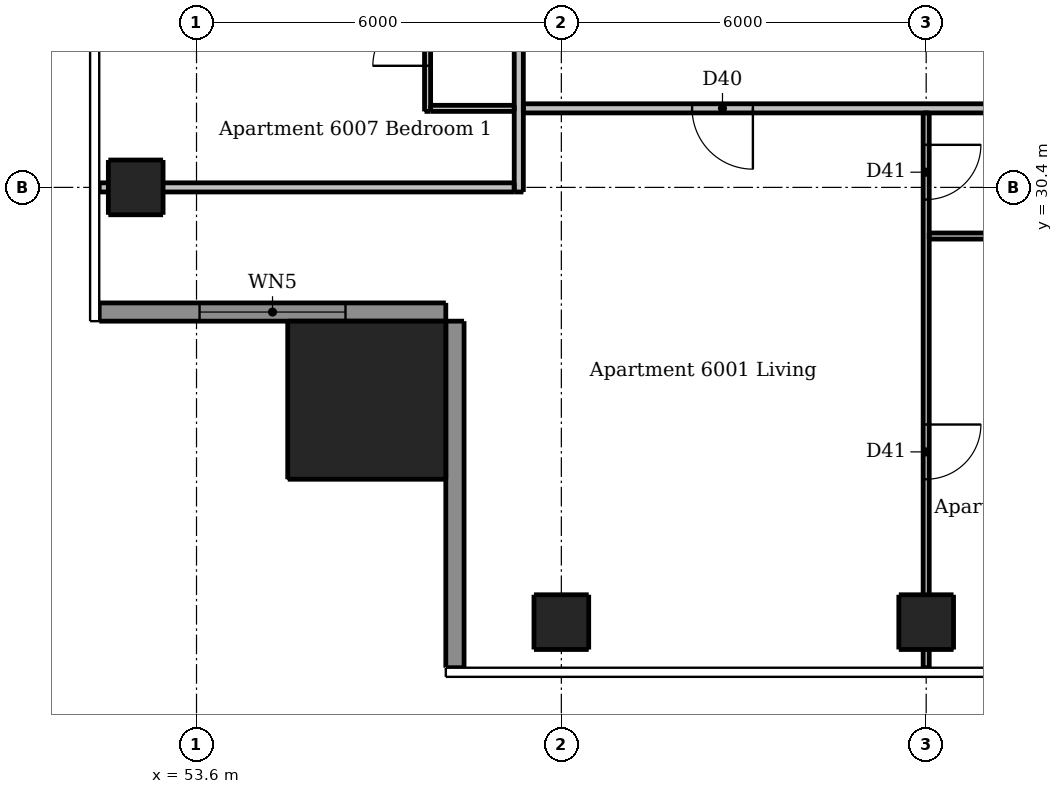
"""IFC4 building model, lengths in metres.
Left out: names, types, materials, properties, quantities, classifications, styles, units other than length and angle.
Written with IfcOpenShell. Run it as: python <this file> out.ifc"""

import sys

from ifc_helpers import new_model, si_unit, direction, frame, frame_2d, origin, origin_2d, place, context, subcontext, project, spatial, rectangle, extrude, element, fill, save


model = new_model("IFC4")
c1 = context("Model", 3, precision=1e-05, world=origin(), true_north=direction((0.0, 1.0)))
c2 = subcontext(c1, "Body", "Model", "MODEL_VIEW")
j1 = project(units=[si_unit("LENGTHUNIT", "METRE"), si_unit("PLANEANGLEUNIT", "RADIAN")], contexts=[c1])
p1 = place(None, origin())
s1 = spatial("IfcSite", under=j1, at=p1, CompositionType="ELEMENT")
p2 = place(p1, origin())
s2 = spatial("IfcBuilding", under=s1, at=p2, CompositionType="ELEMENT")
p3 = place(p2, frame((0.0, 0.0, 223.3)))
s3 = spatial("IfcBuildingStorey", under=s2, at=p3, CompositionType="ELEMENT", Elevation=223.3)
for number, where, z_axis, x_axis in (
    (1, (59.6, 23.25, 0.0), (0.0, 0.0, 1.0), (1.0, 0.0, 0.0)),
    (2, (65.6, 23.25, 0.0), (0.0, 0.0, 1.0), (1.0, 0.0, 0.0)),
    (3, (52.6, 30.4, 0.0), (0.0, 0.0, 1.0), (1.0, 0.0, 0.0)),
):
    element("IfcColumn", number, at=place(p3, frame(where, z_axis=z_axis, x_axis=x_axis)), inside=s3, PredefinedType="COLUMN", context=c2, shape_type="SweptSolid", body=[
        extrude(rectangle(XDim=0.9, YDim=0.9, at=origin_2d()), origin(), (0.0, 0.0, 1.0), 3.05),
    ])
p4 = place(p3, frame((56.4, 26.9, 0.0), z_axis=(0.0, 0.0, 1.0), x_axis=(1.0, 0.0, 0.0)))
e4 = element("IfcColumn", 4, at=p4, inside=s3, PredefinedType="COLUMN", context=c2, shape_type="SweptSolid", body=[
    extrude(rectangle(XDim=2.6, YDim=2.6, at=origin_2d()), origin(), (0.0, 0.0, 1.0), 3.3),
])
p5 = place(p3, frame((52.0, 28.35, 0.0), z_axis=(0.0, 0.0, 1.0), x_axis=(1.0, 0.0, 0.0)))
e5 = element("IfcWall", 5, at=p5, inside=s3, PredefinedType="SOLIDWALL", context=c2, shape_type="SweptSolid", body=[
    extrude(rectangle(XDim=5.7, YDim=0.3, at=frame_2d((2.85, 0.0))), origin(), (0.0, 0.0, 1.0), 3.05),
])
p6 = place(p5, frame((1.65, 0.0, 0.15)))
e6 = element("IfcOpeningElement", 6, at=p6, cuts=e5, PredefinedType="OPENING", context=c2, shape_type="SweptSolid", body=[
    extrude(rectangle(XDim=2.4, YDim=2.1, at=frame_2d((1.2, 1.05))), frame((0.0, 0.16, 0.0), z_axis=(0.0, -1.0, 0.0), x_axis=(1.0, 0.0, 0.0)), (0.0, 0.0, 1.0), 0.32),
])
p7 = place(p3, frame((57.85, 28.2, 0.0), z_axis=(0.0, 0.0, 1.0), x_axis=(0.0, -1.0, 0.0)))
e7 = element("IfcWall", 7, at=p7, inside=s3, PredefinedType="SOLIDWALL", context=c2, shape_type="SweptSolid", body=[
    extrude(rectangle(XDim=5.7, YDim=0.3, at=frame_2d((2.85, 0.0))), origin(), (0.0, 0.0, 1.0), 3.05),
])
p8 = place(p3, frame((57.4, 31.65, 0.0), z_axis=(0.0, 0.0, 1.0), x_axis=(0.0, 1.0, 0.0)))
e8 = element("IfcWall", 8, at=p8, inside=s3, PredefinedType="PARTITIONING", context=c2, shape_type="SweptSolid", body=[
    extrude(rectangle(XDim=16.675, YDim=0.1, at=frame_2d((8.337, 0.0))), origin(), (0.0, 0.0, 1.0), 3.05),
])
p9 = place(p8, frame((9.7, 0.0, 0.0)))
e9 = element("IfcOpeningElement", 9, at=p9, cuts=e8, PredefinedType="OPENING", context=c2, shape_type="SweptSolid", body=[
    extrude(rectangle(XDim=0.9, YDim=2.1, at=frame_2d((0.45, 1.05))), frame((0.0, 0.06, 0.0), z_axis=(0.0, -1.0, 0.0), x_axis=(1.0, 0.0, 0.0)), (0.0, 0.0, 1.0), 0.12),
])
p10 = place(p8, frame((14.8, 0.0, 0.0)))
e10 = element("IfcOpeningElement", 10, at=p10, cuts=e8, PredefinedType="OPENING", context=c2, shape_type="SweptSolid", body=[
    extrude(rectangle(XDim=0.9, YDim=2.1, at=frame_2d((0.45, 1.05))), frame((0.0, 0.06, 0.0), z_axis=(0.0, -1.0, 0.0), x_axis=(1.0, 0.0, 0.0)), (0.0, 0.0, 1.0), 0.12),
])
p11 = place(p8, frame((5.25, 0.0, 0.0)))
e11 = element("IfcOpeningElement", 11, at=p11, cuts=e8, PredefinedType="OPENING", context=c2, shape_type="SweptSolid", body=[
    extrude(rectangle(XDim=0.8, YDim=2.1, at=frame_2d((0.4, 1.05))), frame((0.0, 0.06, 0.0), z_axis=(0.0, -1.0, 0.0), x_axis=(1.0, 0.0, 0.0)), (0.0, 0.0, 1.0), 0.12),
])
p12 = place(p8, frame((0.75, 0.0, 0.0)))
e12 = element("IfcOpeningElement", 12, at=p12, cuts=e8, PredefinedType="OPENING", context=c2, shape_type="SweptSolid", body=[
    extrude(rectangle(XDim=0.9, YDim=2.1, at=frame_2d((0.45, 1.05))), frame((0.0, 0.06, 0.0), z_axis=(0.0, -1.0, 0.0), x_axis=(1.0, 0.0, 0.0)), (0.0, 0.0, 1.0), 0.12),
])
p13 = place(p8, frame((3.15, 0.0, 0.0)))
e13 = element("IfcOpeningElement", 13, at=p13, cuts=e8, PredefinedType="OPENING", context=c2, shape_type="SweptSolid", body=[
    extrude(rectangle(XDim=0.8, YDim=2.1, at=frame_2d((0.4, 1.05))), frame((0.0, 0.06, 0.0), z_axis=(0.0, -1.0, 0.0), x_axis=(1.0, 0.0, 0.0)), (0.0, 0.0, 1.0), 0.12),
])
p14 = place(p3, frame((65.6, 31.625, 0.0), z_axis=(0.0, 0.0, 1.0), x_axis=(0.0, -1.0, 0.0)))
e14 = element("IfcWall", 14, at=p14, inside=s3, PredefinedType="PARTITIONING", context=c2, shape_type="SweptSolid", body=[
    extrude(rectangle(XDim=9.125, YDim=0.1, at=frame_2d((4.562, 0.0))), origin(), (0.0, 0.0, 1.0), 2.516),
])
p15 = place(p14, frame((0.525, 0.0, 0.0)))
e15 = element("IfcOpeningElement", 15, at=p15, cuts=e14, PredefinedType="OPENING", context=c2, shape_type="SweptSolid", body=[
    extrude(rectangle(XDim=0.9, YDim=2.1, at=frame_2d((0.45, 1.05))), frame((0.0, 0.06, 0.0), z_axis=(0.0, -1.0, 0.0), x_axis=(1.0, 0.0, 0.0)), (0.0, 0.0, 1.0), 0.12),
])
p16 = place(p14, frame((5.125, 0.0, 0.0)))
e16 = element("IfcOpeningElement", 16, at=p16, cuts=e14, PredefinedType="OPENING", context=c2, shape_type="SweptSolid", body=[
    extrude(rectangle(XDim=0.9, YDim=2.1, at=frame_2d((0.45, 1.05))), frame((0.0, 0.06, 0.0), z_axis=(0.0, -1.0, 0.0), x_axis=(1.0, 0.0, 0.0)), (0.0, 0.0, 1.0), 0.12),
])
p17 = place(p3, frame((57.45, 31.7, 0.0), z_axis=(0.0, 0.0, 1.0), x_axis=(1.0, 0.0, 0.0)))
e17 = element("IfcWall", 17, at=p17, inside=s3, PredefinedType="PARTITIONING", context=c2, shape_type="SweptSolid", body=[
    extrude(rectangle(XDim=1.375, YDim=0.1, at=frame_2d((0.688, 0.0))), origin(), (0.0, 0.0, 1.0), 3.05),
])
p18 = place(p3, frame((65.65, 29.6, 0.0), z_axis=(0.0, 0.0, 1.0), x_axis=(1.0, 0.0, 0.0)))
e18 = element("IfcWall", 18, at=p18, inside=s3, PredefinedType="PARTITIONING", context=c2, shape_type="SweptSolid", body=[
    extrude(rectangle(XDim=5.875, YDim=0.1, at=frame_2d((2.938, 0.0))), origin(), (0.0, 0.0, 1.0), 3.05),
])
p19 = place(p18, frame((3.75, 0.0, 0.0)))
e19 = element("IfcOpeningElement", 19, at=p19, cuts=e18, PredefinedType="OPENING", context=c2, shape_type="SweptSolid", body=[
    extrude(rectangle(XDim=0.8, YDim=2.1, at=frame_2d((0.4, 1.05))), frame((0.0, 0.06, 0.0), z_axis=(0.0, -1.0, 0.0), x_axis=(1.0, 0.0, 0.0)), (0.0, 0.0, 1.0), 0.12),
])
p20 = place(p3, frame((58.9, 30.325, 0.0), z_axis=(0.0, 0.0, 1.0), x_axis=(0.0, 1.0, 0.0)))
e20 = element("IfcWall", 20, at=p20, inside=s3, PredefinedType="PARTITIONING", context=c2, shape_type="SweptSolid", body=[
    extrude(rectangle(XDim=30.85, YDim=0.15, at=frame_2d((15.425, 0.0))), origin(), (0.0, 0.0, 1.0), 3.05),
])
p21 = place(p20, frame((9.225, 0.0, 0.0)))
e21 = element("IfcOpeningElement", 21, at=p21, cuts=e20, PredefinedType="OPENING", context=c2, shape_type="SweptSolid", body=[
    extrude(rectangle(XDim=1.0, YDim=2.1, at=frame_2d((0.5, 1.05))), frame((0.0, 0.085, 0.0), z_axis=(0.0, -1.0, 0.0), x_axis=(1.0, 0.0, 0.0)), (0.0, 0.0, 1.0), 0.17),
])
p22 = place(p20, frame((26.925, 0.0, 0.0)))
e22 = element("IfcOpeningElement", 22, at=p22, cuts=e20, PredefinedType="OPENING", context=c2, shape_type="SweptSolid", body=[
    extrude(rectangle(XDim=1.0, YDim=2.1, at=frame_2d((0.5, 1.05))), frame((0.0, 0.085, 0.0), z_axis=(0.0, -1.0, 0.0), x_axis=(1.0, 0.0, 0.0)), (0.0, 0.0, 1.0), 0.17),
])
p23 = place(p3, frame((89.525, 31.7, 0.0), z_axis=(0.0, 0.0, 1.0), x_axis=(-1.0, 0.0, 0.0)))
e23 = element("IfcWall", 23, at=p23, inside=s3, PredefinedType="PARTITIONING", context=c2, shape_type="SweptSolid", body=[
    extrude(rectangle(XDim=30.55, YDim=0.15, at=frame_2d((15.275, 0.0))), origin(), (0.0, 0.0, 1.0), 3.05),
])
p24 = place(p23, frame((26.775, 0.0, 0.0)))
e24 = element("IfcOpeningElement", 24, at=p24, cuts=e23, PredefinedType="OPENING", context=c2, shape_type="SweptSolid", body=[
    extrude(rectangle(XDim=1.0, YDim=2.1, at=frame_2d((0.5, 1.05))), frame((0.0, 0.085, 0.0), z_axis=(0.0, -1.0, 0.0), x_axis=(1.0, 0.0, 0.0)), (0.0, 0.0, 1.0), 0.17),
])
p25 = place(p23, frame((9.075, 0.0, 0.0)))
e25 = element("IfcOpeningElement", 25, at=p25, cuts=e23, PredefinedType="OPENING", context=c2, shape_type="SweptSolid", body=[
    extrude(rectangle(XDim=1.0, YDim=2.1, at=frame_2d((0.5, 1.05))), frame((0.0, 0.085, 0.0), z_axis=(0.0, -1.0, 0.0), x_axis=(1.0, 0.0, 0.0)), (0.0, 0.0, 1.0), 0.17),
])
p26 = place(p3, frame((52.0, 30.4, 0.0), z_axis=(0.0, 0.0, 1.0), x_axis=(1.0, 0.0, 0.0)))
e26 = element("IfcWall", 26, at=p26, inside=s3, PredefinedType="PARTITIONING", context=c2, shape_type="SweptSolid", body=[
    extrude(rectangle(XDim=6.825, YDim=0.15, at=frame_2d((3.413, 0.0))), origin(), (0.0, 0.0, 1.0), 2.647),
])
p27 = place(p6, origin())
e27 = element("IfcWindow", 27, at=p27, inside=s3, PartitioningType="DOUBLE_PANEL_VERTICAL", PredefinedType="WINDOW", context=c2, shape_type="SweptSolid", body=[
    extrude(rectangle(XDim=2.4, YDim=2.1, at=frame_2d((1.2, 1.05))), frame((0.0, 0.03, 0.0), z_axis=(0.0, -1.0, 0.0), x_axis=(1.0, 0.0, 0.0)), (0.0, 0.0, 1.0), 0.06),
])
fill(e6, e27)
p28 = place(p24, origin())
e28 = element("IfcDoor", 28, at=p28, inside=s3, OperationType="SINGLE_SWING_LEFT", PredefinedType="DOOR", context=c2, shape_type="SweptSolid", body=[
    extrude(rectangle(XDim=1.0, YDim=2.1, at=frame_2d((0.5, 1.05))), frame((0.0, 0.025, 0.0), z_axis=(0.0, -1.0, 0.0), x_axis=(1.0, 0.0, 0.0)), (0.0, 0.0, 1.0), 0.05),
])
fill(e24, e28)
p29 = place(p15, origin())
e29 = element("IfcDoor", 29, at=p29, inside=s3, OperationType="SINGLE_SWING_LEFT", PredefinedType="DOOR", context=c2, shape_type="SweptSolid", body=[
    extrude(rectangle(XDim=0.9, YDim=2.1, at=frame_2d((0.45, 1.05))), frame((0.0, 0.025, 0.0), z_axis=(0.0, -1.0, 0.0), x_axis=(1.0, 0.0, 0.0)), (0.0, 0.0, 1.0), 0.05),
])
fill(e15, e29)
p30 = place(p16, origin())
e30 = element("IfcDoor", 30, at=p30, inside=s3, OperationType="SINGLE_SWING_LEFT", PredefinedType="DOOR", context=c2, shape_type="SweptSolid", body=[
    extrude(rectangle(XDim=0.9, YDim=2.1, at=frame_2d((0.45, 1.05))), frame((0.0, 0.025, 0.0), z_axis=(0.0, -1.0, 0.0), x_axis=(1.0, 0.0, 0.0)), (0.0, 0.0, 1.0), 0.05),
])
fill(e16, e30)
p31 = place(p12, origin())
e31 = element("IfcDoor", 31, at=p31, inside=s3, OperationType="SINGLE_SWING_LEFT", PredefinedType="DOOR", context=c2, shape_type="SweptSolid", body=[
    extrude(rectangle(XDim=0.9, YDim=2.1, at=frame_2d((0.45, 1.05))), frame((0.0, 0.025, 0.0), z_axis=(0.0, -1.0, 0.0), x_axis=(1.0, 0.0, 0.0)), (0.0, 0.0, 1.0), 0.05),
])
fill(e12, e31)
save(model, sys.argv[1])
